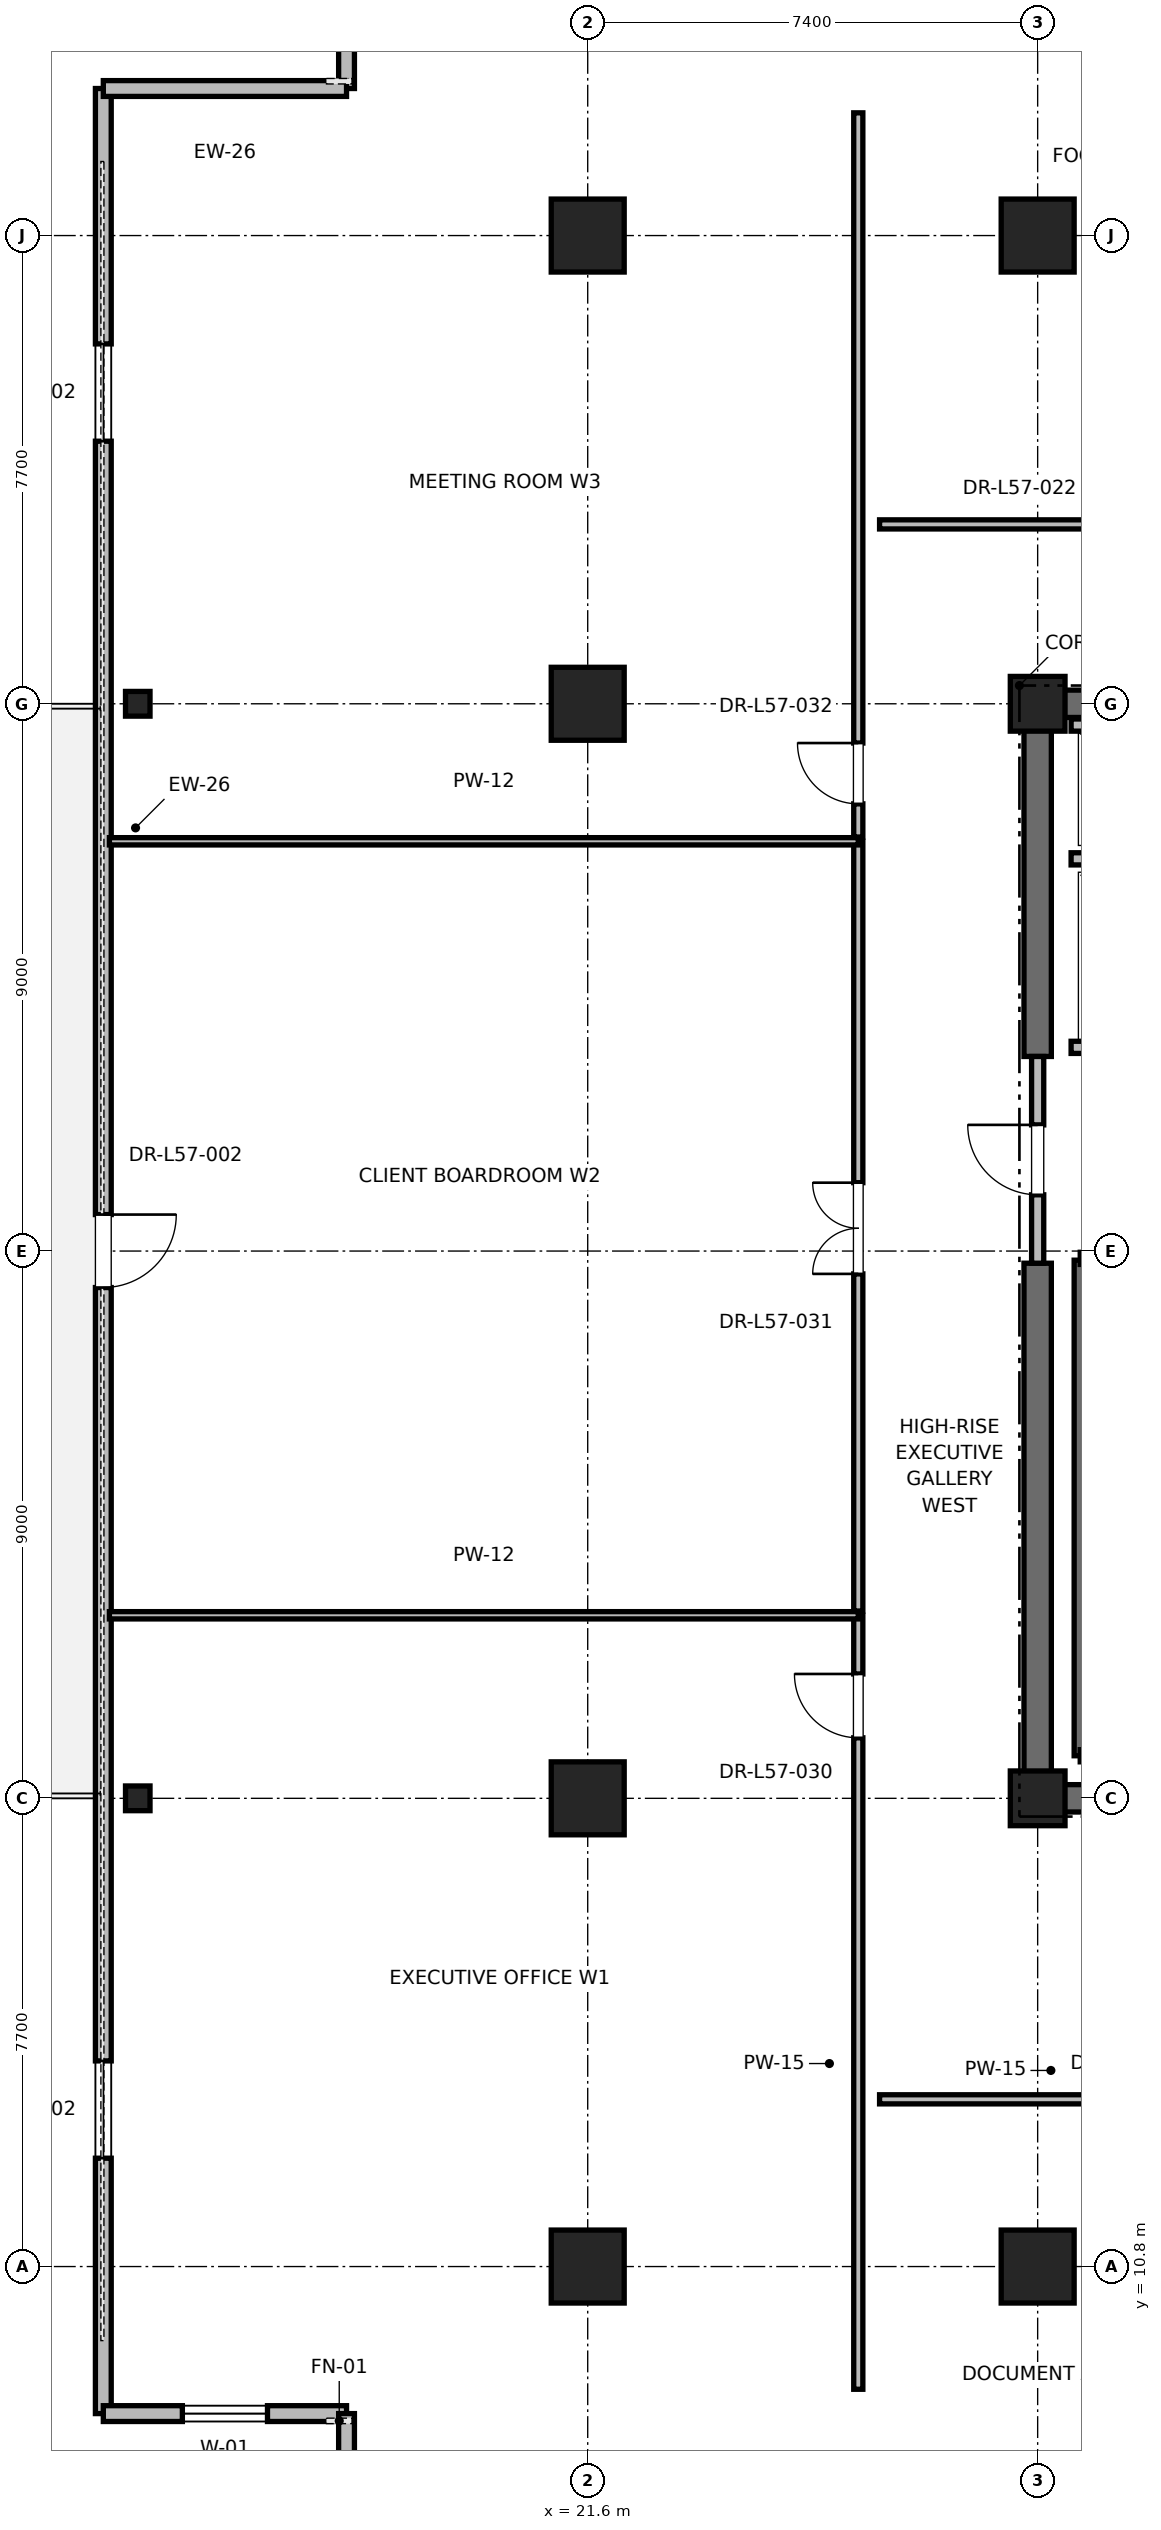
"""IFC4 building model, lengths in metres.
Left out: names, types, materials, properties, quantities, classifications, styles, units other than length and angle.
Written with IfcOpenShell. Run it as: python <this file> out.ifc"""

import sys

from ifc_helpers import new_model, si_unit, direction, frame, frame_2d, origin, origin_2d, place, context, subcontext, project, spatial, rectangle, i_section, extrude, element, fill, save


model = new_model("IFC4")
c1 = context("Model", 3, precision=1e-05, world=origin(), true_north=direction((0.0, 1.0)))
c2 = subcontext(c1, "Body", "Model", "MODEL_VIEW")
j1 = project(units=[si_unit("LENGTHUNIT", "METRE"), si_unit("PLANEANGLEUNIT", "RADIAN")], contexts=[c1])
p1 = place(None, origin())
s1 = spatial("IfcSite", under=j1, at=p1, CompositionType="ELEMENT")
p2 = place(p1, origin())
s2 = spatial("IfcBuilding", under=s1, at=p2, CompositionType="ELEMENT")
p3 = place(p2, frame((0.0, 0.0, 247.2)))
s3 = spatial("IfcBuildingStorey", under=s2, at=p3, CompositionType="ELEMENT", Elevation=247.2)
for number, where, z_axis, x_axis in (
    (1, (29.0, 10.8, 0.0), (0.0, 0.0, 1.0), (1.0, 0.0, 0.0)),
    (2, (29.0, 44.2, 0.0), (0.0, 0.0, 1.0), (1.0, 0.0, 0.0)),
    (3, (21.6, 18.5, 0.0), (0.0, 0.0, 1.0), (1.0, 0.0, 0.0)),
    (4, (21.6, 36.5, 0.0), (0.0, 0.0, 1.0), (1.0, 0.0, 0.0)),
    (5, (21.6, 10.8, 0.0), (0.0, 0.0, 1.0), (1.0, 0.0, 0.0)),
    (6, (21.6, 44.2, 0.0), (0.0, 0.0, 1.0), (1.0, 0.0, 0.0)),
):
    element("IfcColumn", number, at=place(p3, frame(where, z_axis=z_axis, x_axis=x_axis)), inside=s3, PredefinedType="COLUMN", context=c2, shape_type="SweptSolid", body=[
        extrude(rectangle(XDim=1.2, YDim=1.2, at=origin_2d()), origin(), (0.0, 0.0, 1.0), 4.0),
    ])
for number, where, z_axis, x_axis in (
    (7, (14.2, 18.5, 0.0), (0.0, 0.0, 1.0), (1.0, 0.0, 0.0)),
    (8, (14.2, 36.5, 0.0), (0.0, 0.0, 1.0), (1.0, 0.0, 0.0)),
):
    element("IfcColumn", number, at=place(p3, frame(where, z_axis=z_axis, x_axis=x_axis)), inside=s3, PredefinedType="COLUMN", context=c2, shape_type="SweptSolid", body=[
        extrude(i_section(OverallWidth=0.403, OverallDepth=0.406, WebThickness=0.027, FlangeThickness=0.043, FilletRadius=0.015, at=origin_2d()), origin(), (0.0, 0.0, 1.0), 4.0),
    ])
for number, where, z_axis, x_axis in (
    (9, (29.0, 18.5, 0.0), (0.0, 0.0, 1.0), (1.0, 0.0, 0.0)),
    (10, (29.0, 36.5, 0.0), (0.0, 0.0, 1.0), (1.0, 0.0, 0.0)),
):
    element("IfcColumn", number, at=place(p3, frame(where, z_axis=z_axis, x_axis=x_axis)), inside=s3, PredefinedType="PILASTER", context=c2, shape_type="SweptSolid", body=[
        extrude(rectangle(XDim=0.9, YDim=0.9, at=origin_2d()), origin(), (0.0, 0.0, 1.0), 4.0),
    ])
p4 = place(p3, frame((29.0, 18.5, 0.0), z_axis=(0.0, 0.0, 1.0), x_axis=(1.0, 0.0, 0.0)))
e11 = element("IfcWall", 11, at=p4, inside=s3, PredefinedType="SHEAR", context=c2, shape_type="SweptSolid", body=[
    extrude(rectangle(XDim=9.2, YDim=0.45, at=frame_2d((4.6, 0.0))), origin(), (0.0, 0.0, 1.0), 3.785),
])
p5 = place(p3, frame((29.0, 36.5, 0.0), z_axis=(0.0, 0.0, 1.0), x_axis=(1.0, 0.0, 0.0)))
e12 = element("IfcWall", 12, at=p5, inside=s3, PredefinedType="SHEAR", context=c2, shape_type="SweptSolid", body=[
    extrude(rectangle(XDim=5.8, YDim=0.45, at=frame_2d((2.9, 0.0))), origin(), (0.0, 0.0, 1.0), 3.785),
])
p6 = place(p3, frame((29.0, 18.5, 0.0), z_axis=(0.0, 0.0, 1.0), x_axis=(0.0, 1.0, 0.0)))
e13 = element("IfcWall", 13, at=p6, inside=s3, PredefinedType="SHEAR", context=c2, shape_type="SweptSolid", body=[
    extrude(rectangle(XDim=8.8, YDim=0.45, at=frame_2d((4.4, 0.0))), origin(), (0.0, 0.0, 1.0), 3.785),
])
p7 = place(p3, frame((29.0, 30.7, 0.0), z_axis=(0.0, 0.0, 1.0), x_axis=(0.0, 1.0, 0.0)))
e14 = element("IfcWall", 14, at=p7, inside=s3, PredefinedType="SHEAR", context=c2, shape_type="SweptSolid", body=[
    extrude(rectangle(XDim=5.8, YDim=0.45, at=frame_2d((2.9, 0.0))), origin(), (0.0, 0.0, 1.0), 3.785),
])
p8 = place(p3, frame((13.634, 46.618, 0.0), z_axis=(0.0, 0.0, 1.0), x_axis=(0.0, -1.0, 0.0)))
e15 = element("IfcWall", 15, at=p8, inside=s3, PredefinedType="PARAPET", context=c2, shape_type="SweptSolid", body=[
    extrude(rectangle(XDim=38.236, YDim=0.26, at=frame_2d((19.118, 0.0))), origin(), (0.0, 0.0, 1.0), 3.123),
])
p9 = place(p8, frame((4.2, 0.0, 0.85)))
e16 = element("IfcOpeningElement", 16, at=p9, cuts=e15, PredefinedType="OPENING", context=c2, shape_type="SweptSolid", body=[
    extrude(rectangle(XDim=1.6, YDim=2.1, at=frame_2d((0.8, 1.05))), frame((0.0, 0.13, 0.0), z_axis=(0.0, -1.0, 0.0), x_axis=(1.0, 0.0, 0.0)), (0.0, 0.0, 1.0), 0.26),
])
p10 = place(p8, frame((18.518, 0.0, 0.0)))
e17 = element("IfcOpeningElement", 17, at=p10, cuts=e15, PredefinedType="OPENING", context=c2, shape_type="SweptSolid", body=[
    extrude(rectangle(XDim=1.2, YDim=2.2, at=frame_2d((0.6, 1.1))), frame((0.0, 0.13, 0.0), z_axis=(0.0, -1.0, 0.0), x_axis=(1.0, 0.0, 0.0)), (0.0, 0.0, 1.0), 0.26),
])
p11 = place(p8, frame((32.436, 0.0, 0.85)))
e18 = element("IfcOpeningElement", 18, at=p11, cuts=e15, PredefinedType="OPENING", context=c2, shape_type="SweptSolid", body=[
    extrude(rectangle(XDim=1.6, YDim=2.1, at=frame_2d((0.8, 1.05))), frame((0.0, 0.13, 0.0), z_axis=(0.0, -1.0, 0.0), x_axis=(1.0, 0.0, 0.0)), (0.0, 0.0, 1.0), 0.26),
])
p12 = place(p3, frame((13.634, 8.382, 0.0), z_axis=(0.0, 0.0, 1.0), x_axis=(1.0, 0.0, 0.0)))
e19 = element("IfcWall", 19, at=p12, inside=s3, PredefinedType="PARAPET", context=c2, shape_type="SweptSolid", body=[
    extrude(rectangle(XDim=4.0, YDim=0.26, at=frame_2d((2.0, 0.0))), origin(), (0.0, 0.0, 1.0), 3.785),
])
p13 = place(p12, frame((1.3, 0.0, 0.85)))
e20 = element("IfcOpeningElement", 20, at=p13, cuts=e19, PredefinedType="OPENING", context=c2, shape_type="SweptSolid", body=[
    extrude(rectangle(XDim=1.4, YDim=2.0, at=frame_2d((0.7, 1.0))), frame((0.0, 0.13, 0.0), z_axis=(0.0, -1.0, 0.0), x_axis=(1.0, 0.0, 0.0)), (0.0, 0.0, 1.0), 0.26),
])
p14 = place(p3, frame((17.634, 8.382, 0.0), z_axis=(0.0, 0.0, 1.0), x_axis=(0.0, -1.0, 0.0)))
e21 = element("IfcWall", 21, at=p14, inside=s3, PredefinedType="PARAPET", context=c2, shape_type="SweptSolid", body=[
    extrude(rectangle(XDim=3.5, YDim=0.26, at=frame_2d((1.75, 0.0))), origin(), (0.0, 0.0, 1.0), 3.785),
])
p15 = place(p3, frame((17.634, 50.118, 0.0), z_axis=(0.0, 0.0, 1.0), x_axis=(0.0, -1.0, 0.0)))
e22 = element("IfcWall", 22, at=p15, inside=s3, PredefinedType="PARAPET", context=c2, shape_type="SweptSolid", body=[
    extrude(rectangle(XDim=3.5, YDim=0.26, at=frame_2d((1.75, 0.0))), origin(), (0.0, 0.0, 1.0), 3.785),
])
p16 = place(p15, frame((1.05, 0.0, 0.85)))
e23 = element("IfcOpeningElement", 23, at=p16, cuts=e22, PredefinedType="OPENING", context=c2, shape_type="SweptSolid", body=[
    extrude(rectangle(XDim=1.4, YDim=2.0, at=frame_2d((0.7, 1.0))), frame((0.0, 0.13, 0.0), z_axis=(0.0, -1.0, 0.0), x_axis=(1.0, 0.0, 0.0)), (0.0, 0.0, 1.0), 0.26),
])
p17 = place(p3, frame((17.634, 46.618, 0.0), z_axis=(0.0, 0.0, 1.0), x_axis=(-1.0, 0.0, 0.0)))
e24 = element("IfcWall", 24, at=p17, inside=s3, PredefinedType="PARAPET", context=c2, shape_type="SweptSolid", body=[
    extrude(rectangle(XDim=4.0, YDim=0.26, at=frame_2d((2.0, 0.0))), origin(), (0.0, 0.0, 1.0), 3.785),
])
p18 = place(p3, frame((29.7, 19.2, 0.0), z_axis=(0.0, 0.0, 1.0), x_axis=(0.0, 1.0, 0.0)))
e25 = element("IfcWall", 25, at=p18, inside=s3, PredefinedType="SOLIDWALL", context=c2, shape_type="SweptSolid", body=[
    extrude(rectangle(XDim=8.15, YDim=0.2, at=frame_2d((4.075, 0.0))), origin(), (0.0, 0.0, 1.0), 3.785),
])
p19 = place(p3, frame((29.0, 27.3, 0.0), z_axis=(0.0, 0.0, 1.0), x_axis=(0.0, 1.0, 0.0)))
e26 = element("IfcWall", 26, at=p19, inside=s3, PredefinedType="PARTITIONING", context=c2, shape_type="SweptSolid", body=[
    extrude(rectangle(XDim=3.4, YDim=0.2, at=frame_2d((1.7, 0.0))), origin(), (0.0, 0.0, 1.0), 2.865),
])
p20 = place(p19, frame((1.125, 0.0, 0.0)))
e27 = element("IfcOpeningElement", 27, at=p20, cuts=e26, PredefinedType="OPENING", context=c2, shape_type="SweptSolid", body=[
    extrude(rectangle(XDim=1.15, YDim=2.2, at=frame_2d((0.575, 1.1))), frame((0.0, 0.1, 0.0), z_axis=(0.0, -1.0, 0.0), x_axis=(1.0, 0.0, 0.0)), (0.0, 0.0, 1.0), 0.2),
])
p21 = place(p3, frame((29.55, 30.85, 0.0), z_axis=(0.0, 0.0, 1.0), x_axis=(1.0, 0.0, 0.0)))
e28 = element("IfcWall", 28, at=p21, inside=s3, PredefinedType="SOLIDWALL", context=c2, shape_type="SweptSolid", body=[
    extrude(rectangle(XDim=2.6, YDim=0.2, at=frame_2d((1.3, 0.0))), origin(), (0.0, 0.0, 1.0), 2.865),
])
p22 = place(p21, frame((0.75, 0.0, 0.0)))
e29 = element("IfcOpeningElement", 29, at=p22, cuts=e28, PredefinedType="OPENING", context=c2, shape_type="SweptSolid", body=[
    extrude(rectangle(XDim=1.1, YDim=2.2, at=frame_2d((0.55, 1.1))), frame((0.0, 0.1, 0.0), z_axis=(0.0, -1.0, 0.0), x_axis=(1.0, 0.0, 0.0)), (0.0, 0.0, 1.0), 0.2),
])
p23 = place(p3, frame((29.55, 33.95, 0.0), z_axis=(0.0, 0.0, 1.0), x_axis=(1.0, 0.0, 0.0)))
e30 = element("IfcWall", 30, at=p23, inside=s3, PredefinedType="SOLIDWALL", context=c2, shape_type="SweptSolid", body=[
    extrude(rectangle(XDim=2.8, YDim=0.2, at=frame_2d((1.4, 0.0))), origin(), (0.0, 0.0, 1.0), 3.785),
])
p24 = place(p3, frame((32.35, 36.15, 0.0), z_axis=(0.0, 0.0, 1.0), x_axis=(-1.0, 0.0, 0.0)))
e31 = element("IfcWall", 31, at=p24, inside=s3, PredefinedType="SOLIDWALL", context=c2, shape_type="SweptSolid", body=[
    extrude(rectangle(XDim=2.8, YDim=0.2, at=frame_2d((1.4, 0.0))), origin(), (0.0, 0.0, 1.0), 3.148),
])
p25 = place(p3, frame((26.4, 39.45, 0.0), z_axis=(0.0, 0.0, 1.0), x_axis=(1.0, 0.0, 0.0)))
e32 = element("IfcWall", 32, at=p25, inside=s3, PredefinedType="PARTITIONING", context=c2, shape_type="SweptSolid", body=[
    extrude(rectangle(XDim=8.704, YDim=0.15, at=frame_2d((4.352, 0.0))), origin(), (0.0, 0.0, 1.0), 2.85),
])
p26 = place(p25, frame((3.867, 0.0, 0.0)))
e33 = element("IfcOpeningElement", 33, at=p26, cuts=e32, PredefinedType="OPENING", context=c2, shape_type="SweptSolid", body=[
    extrude(rectangle(XDim=1.0, YDim=2.15, at=frame_2d((0.5, 1.075))), frame((0.0, 0.075, 0.0), z_axis=(0.0, -1.0, 0.0), x_axis=(1.0, 0.0, 0.0)), (0.0, 0.0, 1.0), 0.15),
])
p27 = place(p3, frame((26.4, 13.55, 0.0), z_axis=(0.0, 0.0, 1.0), x_axis=(1.0, 0.0, 0.0)))
e34 = element("IfcWall", 34, at=p27, inside=s3, PredefinedType="PARTITIONING", context=c2, shape_type="SweptSolid", body=[
    extrude(rectangle(XDim=12.24, YDim=0.15, at=frame_2d((6.12, 0.0))), origin(), (0.0, 0.0, 1.0), 2.85),
])
p28 = place(p27, frame((5.635, 0.0, 0.0)))
e35 = element("IfcOpeningElement", 35, at=p28, cuts=e34, PredefinedType="OPENING", context=c2, shape_type="SweptSolid", body=[
    extrude(rectangle(XDim=1.0, YDim=2.15, at=frame_2d((0.5, 1.075))), frame((0.0, 0.075, 0.0), z_axis=(0.0, -1.0, 0.0), x_axis=(1.0, 0.0, 0.0)), (0.0, 0.0, 1.0), 0.15),
])
p29 = place(p3, frame((26.05, 8.782, 0.0), z_axis=(0.0, 0.0, 1.0), x_axis=(0.0, 1.0, 0.0)))
e36 = element("IfcWall", 36, at=p29, inside=s3, PredefinedType="PARTITIONING", context=c2, shape_type="SweptSolid", body=[
    extrude(rectangle(XDim=12.729, YDim=0.15, at=frame_2d((6.364, 0.0))), origin(), (0.0, 0.0, 1.0), 2.85),
])
p30 = place(p29, frame((10.713, 0.0, 0.0)))
e37 = element("IfcOpeningElement", 37, at=p30, cuts=e36, PredefinedType="OPENING", context=c2, shape_type="SweptSolid", body=[
    extrude(rectangle(XDim=1.05, YDim=2.2, at=frame_2d((0.525, 1.1))), frame((0.0, 0.075, 0.0), z_axis=(0.0, -1.0, 0.0), x_axis=(1.0, 0.0, 0.0)), (0.0, 0.0, 1.0), 0.15),
])
p31 = place(p3, frame((13.733, 21.51, 0.0), z_axis=(0.0, 0.0, 1.0), x_axis=(1.0, 0.0, 0.0)))
e38 = element("IfcWall", 38, at=p31, inside=s3, PredefinedType="PARTITIONING", context=c2, shape_type="SweptSolid", body=[
    extrude(rectangle(XDim=12.317, YDim=0.12, at=frame_2d((6.158, 0.0))), origin(), (0.0, 0.0, 1.0), 2.85),
])
p32 = place(p3, frame((26.05, 21.58, 0.0), z_axis=(0.0, 0.0, 1.0), x_axis=(0.0, 1.0, 0.0)))
e39 = element("IfcWall", 39, at=p32, inside=s3, PredefinedType="PARTITIONING", context=c2, shape_type="SweptSolid", body=[
    extrude(rectangle(XDim=12.658, YDim=0.15, at=frame_2d((6.329, 0.0))), origin(), (0.0, 0.0, 1.0), 2.85),
])
p33 = place(p32, frame((5.544, 0.0, 0.0)))
e40 = element("IfcOpeningElement", 40, at=p33, cuts=e39, PredefinedType="OPENING", context=c2, shape_type="SweptSolid", body=[
    extrude(rectangle(XDim=1.5, YDim=2.25, at=frame_2d((0.75, 1.125))), frame((0.0, 0.075, 0.0), z_axis=(0.0, -1.0, 0.0), x_axis=(1.0, 0.0, 0.0)), (0.0, 0.0, 1.0), 0.15),
])
p34 = place(p3, frame((13.733, 34.239, 0.0), z_axis=(0.0, 0.0, 1.0), x_axis=(1.0, 0.0, 0.0)))
e41 = element("IfcWall", 41, at=p34, inside=s3, PredefinedType="PARTITIONING", context=c2, shape_type="SweptSolid", body=[
    extrude(rectangle(XDim=12.317, YDim=0.12, at=frame_2d((6.158, 0.0))), origin(), (0.0, 0.0, 1.0), 2.85),
])
p35 = place(p3, frame((26.05, 34.309, 0.0), z_axis=(0.0, 0.0, 1.0), x_axis=(0.0, 1.0, 0.0)))
e42 = element("IfcWall", 42, at=p35, inside=s3, PredefinedType="PARTITIONING", context=c2, shape_type="SweptSolid", body=[
    extrude(rectangle(XDim=11.91, YDim=0.15, at=frame_2d((5.955, 0.0))), origin(), (0.0, 0.0, 1.0), 2.85),
])
p36 = place(p35, frame((0.546, 0.0, 0.0)))
e43 = element("IfcOpeningElement", 43, at=p36, cuts=e42, PredefinedType="OPENING", context=c2, shape_type="SweptSolid", body=[
    extrude(rectangle(XDim=1.0, YDim=2.15, at=frame_2d((0.5, 1.075))), frame((0.0, 0.075, 0.0), z_axis=(0.0, -1.0, 0.0), x_axis=(1.0, 0.0, 0.0)), (0.0, 0.0, 1.0), 0.15),
])
p37 = place(p9, origin())
e44 = element("IfcWindow", 44, at=p37, inside=s3, PartitioningType="SINGLE_PANEL", PredefinedType="WINDOW", context=c2, shape_type="SweptSolid", body=[
    extrude(rectangle(XDim=1.6, YDim=2.1, at=frame_2d((0.8, 1.05))), frame((0.0, 0.03, 0.0), z_axis=(0.0, -1.0, 0.0), x_axis=(1.0, 0.0, 0.0)), (0.0, 0.0, 1.0), 0.06),
])
fill(e16, e44)
p38 = place(p10, origin())
e45 = element("IfcDoor", 45, at=p38, inside=s3, OperationType="SINGLE_SWING_LEFT", PredefinedType="DOOR", context=c2, shape_type="SweptSolid", body=[
    extrude(rectangle(XDim=1.2, YDim=2.2, at=frame_2d((0.6, 1.1))), frame((0.0, 0.025, 0.0), z_axis=(0.0, -1.0, 0.0), x_axis=(1.0, 0.0, 0.0)), (0.0, 0.0, 1.0), 0.05),
])
fill(e17, e45)
p39 = place(p11, origin())
e46 = element("IfcWindow", 46, at=p39, inside=s3, PartitioningType="SINGLE_PANEL", PredefinedType="WINDOW", context=c2, shape_type="SweptSolid", body=[
    extrude(rectangle(XDim=1.6, YDim=2.1, at=frame_2d((0.8, 1.05))), frame((0.0, 0.03, 0.0), z_axis=(0.0, -1.0, 0.0), x_axis=(1.0, 0.0, 0.0)), (0.0, 0.0, 1.0), 0.06),
])
fill(e18, e46)
p40 = place(p13, origin())
e47 = element("IfcWindow", 47, at=p40, inside=s3, PartitioningType="SINGLE_PANEL", PredefinedType="WINDOW", context=c2, shape_type="SweptSolid", body=[
    extrude(rectangle(XDim=1.4, YDim=2.0, at=frame_2d((0.7, 1.0))), frame((0.0, 0.03, 0.0), z_axis=(0.0, -1.0, 0.0), x_axis=(1.0, 0.0, 0.0)), (0.0, 0.0, 1.0), 0.06),
])
fill(e20, e47)
p41 = place(p20, origin())
e48 = element("IfcDoor", 48, at=p41, inside=s3, OperationType="SINGLE_SWING_RIGHT", PredefinedType="DOOR", context=c2, shape_type="SweptSolid", body=[
    extrude(rectangle(XDim=1.15, YDim=2.2, at=frame_2d((0.575, 1.1))), frame((0.0, 0.025, 0.0), z_axis=(0.0, -1.0, 0.0), x_axis=(1.0, 0.0, 0.0)), (0.0, 0.0, 1.0), 0.05),
])
fill(e27, e48)
p42 = place(p30, origin())
e49 = element("IfcDoor", 49, at=p42, inside=s3, OperationType="SINGLE_SWING_RIGHT", PredefinedType="DOOR", context=c2, shape_type="SweptSolid", body=[
    extrude(rectangle(XDim=1.05, YDim=2.2, at=frame_2d((0.525, 1.1))), frame((0.0, 0.025, 0.0), z_axis=(0.0, -1.0, 0.0), x_axis=(1.0, 0.0, 0.0)), (0.0, 0.0, 1.0), 0.05),
])
fill(e37, e49)
p43 = place(p33, origin())
e50 = element("IfcDoor", 50, at=p43, inside=s3, OperationType="DOUBLE_DOOR_SINGLE_SWING", PredefinedType="DOOR", context=c2, shape_type="SweptSolid", body=[
    extrude(rectangle(XDim=1.5, YDim=2.25, at=frame_2d((0.75, 1.125))), frame((0.0, 0.025, 0.0), z_axis=(0.0, -1.0, 0.0), x_axis=(1.0, 0.0, 0.0)), (0.0, 0.0, 1.0), 0.05),
])
fill(e40, e50)
p44 = place(p36, origin())
e51 = element("IfcDoor", 51, at=p44, inside=s3, OperationType="SINGLE_SWING_RIGHT", PredefinedType="DOOR", context=c2, shape_type="SweptSolid", body=[
    extrude(rectangle(XDim=1.0, YDim=2.15, at=frame_2d((0.5, 1.075))), frame((0.0, 0.025, 0.0), z_axis=(0.0, -1.0, 0.0), x_axis=(1.0, 0.0, 0.0)), (0.0, 0.0, 1.0), 0.05),
])
fill(e43, e51)
save(model, sys.argv[1])
